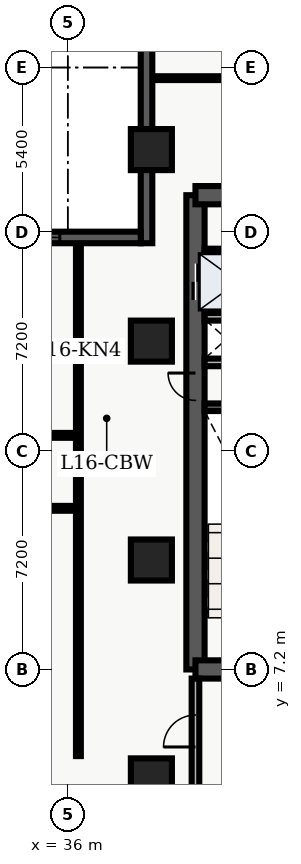
"""IFC4 building model, lengths in metres.
Left out: names, types, materials, properties, quantities, classifications, styles, units other than length and angle.
Written with IfcOpenShell. Run it as: python <this file> out.ifc"""

import sys

from ifc_helpers import new_model, entity, si_unit, converted_unit, direction, frame, origin_with_axes, origin_2d_with_axis, place, context, subcontext, project, spatial, polyline, rectangle, outline, extrude, element, fill, save


model = new_model("IFC4")
c1 = context("Model", 3, precision=1e-05, world=origin_with_axes(), true_north=direction((0.0, 1.0)))
c2 = subcontext(c1, "Body", "Model", "MODEL_VIEW")
j1 = project(units=[si_unit("LENGTHUNIT", "METRE"), converted_unit("PLANEANGLEUNIT", "DEGREE", entity("IfcPlaneAngleMeasure", 0.017), si_unit("PLANEANGLEUNIT", "RADIAN"), dimensions=[0, 0, 0, 0, 0, 0, 0])], contexts=[c1])
p1 = place(None, origin_with_axes())
s1 = spatial("IfcSite", under=j1, at=p1, CompositionType="ELEMENT")
p2 = place(p1, origin_with_axes())
s2 = spatial("IfcBuilding", under=s1, at=p2, CompositionType="ELEMENT")
p3 = place(p2, frame((0.0, 0.0, 67.8), z_axis=(0.0, 0.0, 1.0), x_axis=(1.0, 0.0, 0.0)))
s3 = spatial("IfcBuildingStorey", under=s2, at=p3, CompositionType="ELEMENT", Elevation=67.8)
p4 = place(p3, frame((40.2, 7.2, 0.0), z_axis=(0.0, 0.0, 1.0), x_axis=(0.0, 1.0, 0.0)))
e1 = element("IfcWall", 1, at=p4, inside=s3, PredefinedType="SHEAR", context=c2, shape_type="SweptSolid", body=[
    extrude(outline(polyline([(0.0, -0.3), (15.6, -0.3), (15.6, 0.3), (0.0, 0.3), (0.0, -0.3)])), origin_with_axes(), (0.0, 0.0, 1.0), 3.66),
])
p5 = place(p4, frame((12.75, 0.0, 0.0), z_axis=(0.0, 0.0, 1.0), x_axis=(1.0, 0.0, 0.0)))
e2 = element("IfcOpeningElement", 2, at=p5, cuts=e1, PredefinedType="OPENING", context=c2, shape_type="SweptSolid", body=[
    extrude(rectangle(XDim=1.2, YDim=0.62, at=origin_2d_with_axis()), origin_with_axes(), (0.0, 0.0, 1.0), 2.15),
])
p6 = place(p4, frame((9.3, 0.0, 0.0), z_axis=(0.0, 0.0, 1.0), x_axis=(1.0, 0.0, 0.0)))
e3 = element("IfcOpeningElement", 3, at=p6, cuts=e1, PredefinedType="OPENING", context=c2, shape_type="SweptSolid", body=[
    extrude(rectangle(XDim=0.9, YDim=0.62, at=origin_2d_with_axis()), origin_with_axes(), (0.0, 0.0, 1.0), 2.15),
])
p7 = place(p3, frame((40.2, 7.2, 0.0), z_axis=(0.0, 0.0, 1.0), x_axis=(1.0, 0.0, 0.0)))
e4 = element("IfcWall", 4, at=p7, inside=s3, PredefinedType="SHEAR", context=c2, shape_type="SweptSolid", body=[
    extrude(outline(polyline([(0.0, -0.3), (7.85, -0.3), (7.85, 0.3), (0.0, 0.3), (0.0, -0.3)])), origin_with_axes(), (0.0, 0.0, 1.0), 3.66),
])
p8 = place(p7, frame((2.175, 0.0, 0.0), z_axis=(0.0, 0.0, 1.0), x_axis=(1.0, 0.0, 0.0)))
e5 = element("IfcOpeningElement", 5, at=p8, cuts=e4, PredefinedType="OPENING", context=c2, shape_type="SweptSolid", body=[
    extrude(rectangle(XDim=1.05, YDim=0.62, at=origin_2d_with_axis()), origin_with_axes(), (0.0, 0.0, 1.0), 2.15),
])
p9 = place(p3, frame((40.2, 22.8, 0.0), z_axis=(0.0, 0.0, 1.0), x_axis=(1.0, 0.0, 0.0)))
e6 = element("IfcWall", 6, at=p9, inside=s3, PredefinedType="SHEAR", context=c2, shape_type="SweptSolid", body=[
    extrude(outline(polyline([(0.0, -0.3), (7.85, -0.3), (7.85, 0.3), (0.0, 0.3), (0.0, -0.3)])), origin_with_axes(), (0.0, 0.0, 1.0), 3.66),
])
p10 = place(p9, frame((5.775, 0.0, 0.0), z_axis=(0.0, 0.0, 1.0), x_axis=(1.0, 0.0, 0.0)))
e7 = element("IfcOpeningElement", 7, at=p10, cuts=e6, PredefinedType="OPENING", context=c2, shape_type="SweptSolid", body=[
    extrude(rectangle(XDim=1.05, YDim=0.62, at=origin_2d_with_axis()), origin_with_axes(), (0.0, 0.0, 1.0), 2.15),
])
p11 = place(p9, frame((2.15, 0.0, 0.0), z_axis=(0.0, 0.0, 1.0), x_axis=(1.0, 0.0, 0.0)))
e8 = element("IfcOpeningElement", 8, at=p11, cuts=e6, PredefinedType="OPENING", context=c2, shape_type="SweptSolid", body=[
    extrude(rectangle(XDim=0.9, YDim=0.62, at=origin_2d_with_axis()), origin_with_axes(), (0.0, 0.0, 1.0), 2.15),
])
p12 = place(p3, frame((40.5, 15.825, 0.0), z_axis=(0.0, 0.0, 1.0), x_axis=(1.0, 0.0, 0.0)))
e9 = element("IfcWall", 9, at=p12, inside=s3, PredefinedType="SHEAR", context=c2, shape_type="SweptSolid", body=[
    extrude(outline(polyline([(0.0, -0.125), (3.5, -0.125), (3.5, 0.125), (0.0, 0.125), (0.0, -0.125)])), origin_with_axes(), (0.0, 0.0, 1.0), 3.66),
])
p13 = place(p3, frame((40.5, 17.3, 0.0), z_axis=(0.0, 0.0, 1.0), x_axis=(1.0, 0.0, 0.0)))
e10 = element("IfcWall", 10, at=p13, inside=s3, PredefinedType="SOLIDWALL", context=c2, shape_type="SweptSolid", body=[
    extrude(outline(polyline([(0.0, -0.125), (3.5, -0.125), (3.5, 0.125), (0.0, 0.125), (0.0, -0.125)])), origin_with_axes(), (0.0, 0.0, 1.0), 2.7),
])
p14 = place(p13, frame((2.4, 0.0, 0.0), z_axis=(0.0, 0.0, 1.0), x_axis=(1.0, 0.0, 0.0)))
e11 = element("IfcOpeningElement", 11, at=p14, cuts=e10, PredefinedType="OPENING", context=c2, shape_type="SweptSolid", body=[
    extrude(rectangle(XDim=0.9, YDim=0.27, at=origin_2d_with_axis()), origin_with_axes(), (0.0, 0.0, 1.0), 2.15),
])
p15 = place(p3, frame((40.5, 18.8, 0.0), z_axis=(0.0, 0.0, 1.0), x_axis=(1.0, 0.0, 0.0)))
e12 = element("IfcWall", 12, at=p15, inside=s3, PredefinedType="SOLIDWALL", context=c2, shape_type="SweptSolid", body=[
    extrude(outline(polyline([(0.0, -0.125), (3.5, -0.125), (3.5, 0.125), (0.0, 0.125), (0.0, -0.125)])), origin_with_axes(), (0.0, 0.0, 1.0), 2.7),
])
p16 = place(p3, frame((40.2, 3.1, 0.0), z_axis=(0.0, 0.0, 1.0), x_axis=(0.0, 1.0, 0.0)))
e13 = element("IfcWall", 13, at=p16, inside=s3, PredefinedType="SOLIDWALL", context=c2, shape_type="SweptSolid", body=[
    extrude(outline(polyline([(0.0, -0.125), (3.8, -0.125), (3.8, 0.125), (0.0, 0.125), (0.0, -0.125)])), origin_with_axes(), (0.0, 0.0, 1.0), 2.7),
])
p17 = place(p16, frame((2.075, 0.0, 0.0), z_axis=(0.0, 0.0, 1.0), x_axis=(1.0, 0.0, 0.0)))
e14 = element("IfcOpeningElement", 14, at=p17, cuts=e13, PredefinedType="OPENING", context=c2, shape_type="SweptSolid", body=[
    extrude(rectangle(XDim=1.05, YDim=0.27, at=origin_2d_with_axis()), origin_with_axes(), (0.0, 0.0, 1.0), 2.15),
])
for number, where, z_axis, x_axis in (
    (15, (38.75, 3.6, 0.0), (0.0, 0.0, 1.0), (1.0, 0.0, 0.0)),
    (16, (38.75, 10.8, 0.0), (0.0, 0.0, 1.0), (1.0, 0.0, 0.0)),
    (17, (38.75, 18.0, 0.0), (0.0, 0.0, 1.0), (1.0, 0.0, 0.0)),
    (18, (38.75, 24.3, 0.0), (0.0, 0.0, 1.0), (1.0, 0.0, 0.0)),
):
    element("IfcColumn", number, at=place(p3, frame(where, z_axis=z_axis, x_axis=x_axis)), inside=s3, PredefinedType="COLUMN", context=c2, shape_type="SweptSolid", body=[
        extrude(rectangle(XDim=1.35, YDim=1.35, at=origin_2d_with_axis()), origin_with_axes(), (0.0, 0.0, 1.0), 3.9),
    ])
p18 = place(p3, frame((40.5, 20.96, 0.0), z_axis=(0.0, 0.0, 1.0), x_axis=(1.0, 0.0, 0.0)))
e19 = element("IfcWall", 19, at=p18, inside=s3, PredefinedType="PARTITIONING", context=c2, shape_type="SweptSolid", body=[
    extrude(outline(polyline([(0.0, -0.08), (3.5, -0.08), (3.5, 0.08), (0.0, 0.08), (0.0, -0.08)])), origin_with_axes(), (0.0, 0.0, 1.0), 2.7),
])
p19 = place(p3, frame((21.15, 12.5, 0.0), z_axis=(0.0, 0.0, 1.0), x_axis=(1.0, 0.0, 0.0)))
e20 = element("IfcWall", 20, at=p19, inside=s3, PredefinedType="PARTITIONING", context=c2, shape_type="SweptSolid", body=[
    extrude(outline(polyline([(0.0, -0.08), (15.2, -0.08), (15.2, 0.08), (0.0, 0.08), (0.0, -0.08)])), origin_with_axes(), (0.0, 0.0, 1.0), 2.7),
])
p20 = place(p19, frame((7.65, 0.0, 0.0), z_axis=(0.0, 0.0, 1.0), x_axis=(1.0, 0.0, 0.0)))
e21 = element("IfcOpeningElement", 21, at=p20, cuts=e20, PredefinedType="OPENING", context=c2, shape_type="SweptSolid", body=[
    extrude(rectangle(XDim=1.0, YDim=0.18, at=origin_2d_with_axis()), origin_with_axes(), (0.0, 0.0, 1.0), 2.15),
])
p21 = place(p3, frame((21.15, 14.9, 0.0), z_axis=(0.0, 0.0, 1.0), x_axis=(1.0, 0.0, 0.0)))
e22 = element("IfcWall", 22, at=p21, inside=s3, PredefinedType="PARTITIONING", context=c2, shape_type="SweptSolid", body=[
    extrude(outline(polyline([(0.0, -0.08), (15.2, -0.08), (15.2, 0.08), (0.0, 0.08), (0.0, -0.08)])), origin_with_axes(), (0.0, 0.0, 1.0), 2.7),
])
p22 = place(p21, frame((3.315, 0.0, 0.0), z_axis=(0.0, 0.0, 1.0), x_axis=(1.0, 0.0, 0.0)))
e23 = element("IfcOpeningElement", 23, at=p22, cuts=e22, PredefinedType="OPENING", context=c2, shape_type="SweptSolid", body=[
    extrude(rectangle(XDim=1.0, YDim=0.18, at=origin_2d_with_axis()), origin_with_axes(), (0.0, 0.0, 1.0), 2.15),
])
p23 = place(p21, frame((7.632, 0.0, 0.0), z_axis=(0.0, 0.0, 1.0), x_axis=(1.0, 0.0, 0.0)))
e24 = element("IfcOpeningElement", 24, at=p23, cuts=e22, PredefinedType="OPENING", context=c2, shape_type="SweptSolid", body=[
    extrude(rectangle(XDim=1.0, YDim=0.18, at=origin_2d_with_axis()), origin_with_axes(), (0.0, 0.0, 1.0), 2.15),
])
p24 = place(p21, frame((10.3, 0.0, 0.0), z_axis=(0.0, 0.0, 1.0), x_axis=(1.0, 0.0, 0.0)))
e25 = element("IfcOpeningElement", 25, at=p24, cuts=e22, PredefinedType="OPENING", context=c2, shape_type="SweptSolid", body=[
    extrude(rectangle(XDim=1.0, YDim=0.18, at=origin_2d_with_axis()), origin_with_axes(), (0.0, 0.0, 1.0), 2.15),
])
p25 = place(p21, frame((13.453, 0.0, 0.0), z_axis=(0.0, 0.0, 1.0), x_axis=(1.0, 0.0, 0.0)))
e26 = element("IfcOpeningElement", 26, at=p25, cuts=e22, PredefinedType="OPENING", context=c2, shape_type="SweptSolid", body=[
    extrude(rectangle(XDim=1.0, YDim=0.18, at=origin_2d_with_axis()), origin_with_axes(), (0.0, 0.0, 1.0), 2.15),
])
p26 = place(p3, frame((36.35, 4.35, 0.0), z_axis=(0.0, 0.0, 1.0), x_axis=(0.0, 1.0, 0.0)))
e27 = element("IfcWall", 27, at=p26, inside=s3, PredefinedType="PARTITIONING", context=c2, shape_type="SweptSolid", body=[
    extrude(outline(polyline([(0.0, -0.08), (16.95, -0.08), (16.95, 0.08), (0.0, 0.08), (0.0, -0.08)])), origin_with_axes(), (0.0, 0.0, 1.0), 2.7),
])
p27 = place(p3, frame((38.76, 26.65, 0.0), z_axis=(0.0, 0.0, 1.0), x_axis=(1.0, 0.0, 0.0)))
e28 = element("IfcWall", 28, at=p27, inside=s3, PredefinedType="PARTITIONING", context=c2, shape_type="SweptSolid", body=[
    extrude(outline(polyline([(0.0, -0.062), (20.88, -0.062), (20.88, 0.062), (0.0, 0.062), (0.0, -0.062)])), origin_with_axes(), (0.0, 0.0, 1.0), 2.7),
])
p28 = place(p27, frame((4.24, 0.0, 0.0), z_axis=(0.0, 0.0, 1.0), x_axis=(1.0, 0.0, 0.0)))
e29 = element("IfcOpeningElement", 29, at=p28, cuts=e28, PredefinedType="OPENING", context=c2, shape_type="SweptSolid", body=[
    extrude(rectangle(XDim=1.0, YDim=0.145, at=origin_2d_with_axis()), origin_with_axes(), (0.0, 0.0, 1.0), 2.15),
])
p29 = place(p3, frame((38.59, 21.22, 0.0), z_axis=(0.0, 0.0, 1.0), x_axis=(0.0, 1.0, 0.0)))
e30 = element("IfcWall", 30, at=p29, inside=s3, PredefinedType="SOLIDWALL", context=c2, shape_type="SweptSolid", body=[
    extrude(outline(polyline([(0.0, -0.19), (7.58, -0.19), (7.58, 0.19), (0.0, 0.19), (0.0, -0.19)])), origin_with_axes(), (0.0, 0.0, 1.0), 3.66),
])
p30 = place(p3, frame((21.22, 21.41, 0.0), z_axis=(0.0, 0.0, 1.0), x_axis=(1.0, 0.0, 0.0)))
e31 = element("IfcWall", 31, at=p30, inside=s3, PredefinedType="SOLIDWALL", context=c2, shape_type="SweptSolid", body=[
    extrude(outline(polyline([(0.0, -0.19), (17.18, -0.19), (17.18, 0.19), (0.0, 0.19), (0.0, -0.19)])), origin_with_axes(), (0.0, 0.0, 1.0), 3.66),
])
p31 = place(p30, frame((3.263, 0.0, 0.45), z_axis=(0.0, 0.0, 1.0), x_axis=(1.0, 0.0, 0.0)))
e32 = element("IfcOpeningElement", 32, at=p31, cuts=e31, PredefinedType="OPENING", context=c2, shape_type="SweptSolid", body=[
    extrude(rectangle(XDim=2.1, YDim=0.4, at=origin_2d_with_axis()), origin_with_axes(), (0.0, 0.0, 1.0), 2.2),
])
p32 = place(p30, frame((13.467, 0.0, 0.45), z_axis=(0.0, 0.0, 1.0), x_axis=(1.0, 0.0, 0.0)))
e33 = element("IfcOpeningElement", 33, at=p32, cuts=e31, PredefinedType="OPENING", context=c2, shape_type="SweptSolid", body=[
    extrude(rectangle(XDim=2.1, YDim=0.4, at=origin_2d_with_axis()), origin_with_axes(), (0.0, 0.0, 1.0), 2.2),
])
p33 = place(p4, frame((12.75, 0.0, 0.0), z_axis=(0.0, 0.0, 1.0), x_axis=(1.0, 0.0, 0.0)))
e34 = element("IfcDoor", 34, at=p33, inside=s3, OperationType="DOUBLE_DOOR_SLIDING", PredefinedType="DOOR", context=c2, shape_type="SweptSolid", body=[
    extrude(rectangle(XDim=1.2, YDim=0.09, at=origin_2d_with_axis()), origin_with_axes(), (0.0, 0.0, 1.0), 2.15),
])
fill(e2, e34)
p34 = place(p4, frame((9.3, 0.0, 0.0), z_axis=(0.0, 0.0, 1.0), x_axis=(1.0, 0.0, 0.0)))
e35 = element("IfcDoor", 35, at=p34, inside=s3, OperationType="SINGLE_SWING_RIGHT", PredefinedType="DOOR", context=c2, shape_type="SweptSolid", body=[
    extrude(rectangle(XDim=0.9, YDim=0.09, at=origin_2d_with_axis()), origin_with_axes(), (0.0, 0.0, 1.0), 2.15),
])
fill(e3, e35)
p35 = place(p16, frame((2.075, 0.0, 0.0), z_axis=(0.0, 0.0, 1.0), x_axis=(1.0, 0.0, 0.0)))
e36 = element("IfcDoor", 36, at=p35, inside=s3, OperationType="SINGLE_SWING_LEFT", PredefinedType="DOOR", context=c2, shape_type="SweptSolid", body=[
    extrude(rectangle(XDim=1.05, YDim=0.09, at=origin_2d_with_axis()), origin_with_axes(), (0.0, 0.0, 1.0), 2.15),
])
fill(e14, e36)
p36 = place(p30, frame((13.467, 0.0, 0.45), z_axis=(0.0, 0.0, 1.0), x_axis=(1.0, 0.0, 0.0)))
e37 = element("IfcWindow", 37, at=p36, inside=s3, PredefinedType="WINDOW", context=c2, shape_type="SweptSolid", body=[
    extrude(rectangle(XDim=2.1, YDim=0.09, at=origin_2d_with_axis()), origin_with_axes(), (0.0, 0.0, 1.0), 2.2),
])
fill(e33, e37)
save(model, sys.argv[1])
